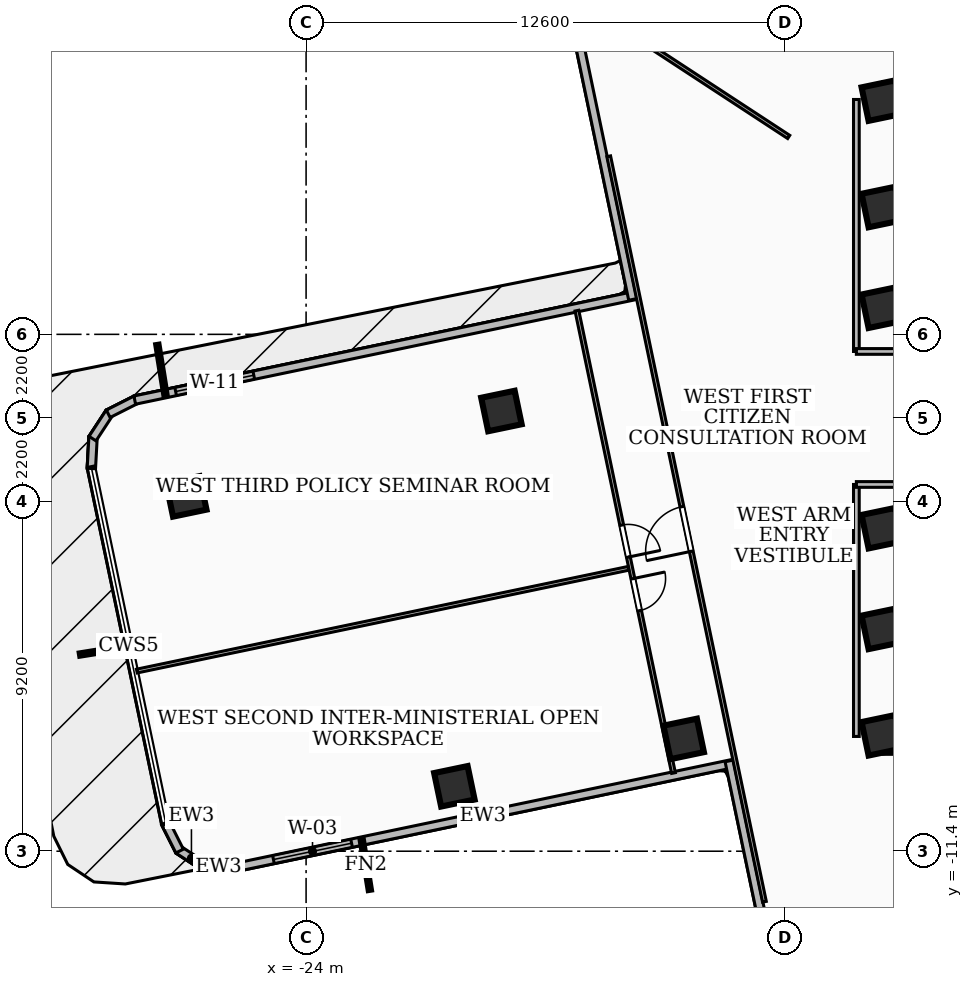
"""IFC4 building model, lengths in metres.
Left out: names, types, materials, properties, quantities, classifications, styles, units other than length and angle.
Written with IfcOpenShell. Run it as: python <this file> out.ifc"""

import sys

from ifc_helpers import new_model, si_unit, direction, frame, frame_2d, origin, origin_2d, place, context, subcontext, project, spatial, rectangle, extrude, element, fill, save


model = new_model("IFC4")
c1 = context("Model", 3, precision=1e-05, world=origin(), true_north=direction((0.0, 1.0)))
c2 = subcontext(c1, "Body", "Model", "MODEL_VIEW")
j1 = project(units=[si_unit("LENGTHUNIT", "METRE"), si_unit("PLANEANGLEUNIT", "RADIAN")], contexts=[c1])
p1 = place(None, origin())
s1 = spatial("IfcSite", under=j1, at=p1, CompositionType="ELEMENT")
p2 = place(p1, origin())
s2 = spatial("IfcBuilding", under=s1, at=p2, CompositionType="ELEMENT")
p3 = place(p2, frame((0.0, 0.0, 111.96)))
s3 = spatial("IfcBuildingStorey", under=s2, at=p3, CompositionType="ELEMENT", Elevation=111.96)
for number, where, z_axis, x_axis in (
    (1, (-8.78, 8.56, 0.0), (0.0, 0.0, 1.0), (1.0, 0.0, 0.0)),
    (2, (8.78, -8.56, 0.0), (0.0, 0.0, 1.0), (-1.0, 0.0, 0.0)),
):
    element("IfcWall", number, at=place(p3, frame(where, z_axis=z_axis, x_axis=x_axis)), inside=s3, PredefinedType="SHEAR", context=c2, shape_type="SweptSolid", body=[
        extrude(rectangle(XDim=17.56, YDim=0.5, at=frame_2d((8.78, 0.0))), origin(), (0.0, 0.0, 1.0), 4.06),
    ])
for number, where, z_axis, x_axis in (
    (3, (-8.85, -5.55, 0.0), (0.0, 0.0, 1.0), (0.979, 0.204, 0.0)),
    (4, (-8.85, -2.9, 0.0), (0.0, 0.0, 1.0), (0.979, 0.204, 0.0)),
    (5, (-8.85, 2.9, 0.0), (0.0, 0.0, 1.0), (0.979, 0.204, 0.0)),
    (6, (-8.85, 5.55, 0.0), (0.0, 0.0, 1.0), (0.979, 0.204, 0.0)),
    (7, (-8.85, 8.35, 0.0), (0.0, 0.0, 1.0), (0.979, 0.204, 0.0)),
    (8, (-8.85, -8.35, 0.0), (0.0, 0.0, 1.0), (0.979, 0.204, 0.0)),
    (9, (-18.86, 0.183, 0.0), (0.0, 0.0, 1.0), (0.979, 0.204, 0.0)),
    (10, (-14.064, -8.445, 0.0), (0.0, 0.0, 1.0), (0.979, 0.204, 0.0)),
    (11, (-27.153, -2.064, 0.0), (0.0, 0.0, 1.0), (0.979, 0.204, 0.0)),
    (12, (-20.098, -9.692, 0.0), (0.0, 0.0, 1.0), (0.979, 0.204, 0.0)),
):
    element("IfcColumn", number, at=place(p3, frame(where, z_axis=z_axis, x_axis=x_axis)), inside=s3, PredefinedType="COLUMN", context=c2, shape_type="SweptSolid", body=[
        extrude(rectangle(XDim=0.9, YDim=0.9, at=origin_2d()), origin(), (0.0, 0.0, 1.0), 4.32),
    ])
p4 = place(p3, frame((-12.763, -9.092, 0.0), z_axis=(0.0, 0.0, 1.0), x_axis=(-0.97886813171, -0.204492495517, 0.0)))
e13 = element("IfcWall", 13, at=p4, inside=s3, PredefinedType="SOLIDWALL", context=c2, shape_type="SweptSolid", body=[
    extrude(rectangle(XDim=13.458, YDim=0.22, at=frame_2d((6.729, 0.0))), origin(), (0.0, 0.0, 1.0), 4.06),
])
p5 = place(p4, frame((10.257, 0.0, 0.85)))
e14 = element("IfcOpeningElement", 14, at=p5, cuts=e13, PredefinedType="OPENING", context=c2, shape_type="SweptSolid", body=[
    extrude(rectangle(XDim=2.1, YDim=2.0, at=frame_2d((1.05, 1.0))), frame((0.0, 0.12, 0.0), z_axis=(0.0, -1.0, 0.0), x_axis=(1.0, 0.0, 0.0)), (0.0, 0.0, 1.0), 0.24),
])
p6 = place(p3, frame((-25.887, -11.84, 0.0), z_axis=(0.0, 0.0, 1.0), x_axis=(-0.998469344193, 0.05530794433, 0.0)))
e15 = element("IfcWall", 15, at=p6, inside=s3, PredefinedType="SOLIDWALL", context=c2, shape_type="SweptSolid", body=[
    extrude(rectangle(XDim=0.834, YDim=0.22, at=frame_2d((0.417, 0.0))), origin(), (0.0, 0.0, 1.0), 4.06),
])
p7 = place(p3, frame((-26.674, -11.809, 0.0), z_axis=(0.0, 0.0, 1.0), x_axis=(-0.836738727822, 0.54760232045, 0.0)))
e16 = element("IfcWall", 16, at=p7, inside=s3, PredefinedType="SOLIDWALL", context=c2, shape_type="SweptSolid", body=[
    extrude(rectangle(XDim=0.82, YDim=0.22, at=frame_2d((0.41, 0.0))), origin(), (0.0, 0.0, 1.0), 4.06),
])
p8 = place(p3, frame((-27.328, -11.396, 0.0), z_axis=(0.0, 0.0, 1.0), x_axis=(-0.450141805655, 0.892957084524, 0.0)))
e17 = element("IfcWall", 17, at=p8, inside=s3, PredefinedType="SOLIDWALL", context=c2, shape_type="SweptSolid", body=[
    extrude(rectangle(XDim=0.833, YDim=0.22, at=frame_2d((0.417, 0.0))), origin(), (0.0, 0.0, 1.0), 4.06),
])
p9 = place(p3, frame((-29.651, -1.33, 0.0), z_axis=(0.0, 0.0, 1.0), x_axis=(0.055016197793, 0.998485462078, 0.0)))
e18 = element("IfcWall", 18, at=p9, inside=s3, PredefinedType="SOLIDWALL", context=c2, shape_type="SweptSolid", body=[
    extrude(rectangle(XDim=0.834, YDim=0.22, at=frame_2d((0.417, 0.0))), origin(), (0.0, 0.0, 1.0), 4.06),
])
p10 = place(p3, frame((-29.62, -0.543, 0.0), z_axis=(0.0, 0.0, 1.0), x_axis=(0.54835696222, 0.836244367386, 0.0)))
e19 = element("IfcWall", 19, at=p10, inside=s3, PredefinedType="SOLIDWALL", context=c2, shape_type="SweptSolid", body=[
    extrude(rectangle(XDim=0.819, YDim=0.22, at=frame_2d((0.41, 0.0))), origin(), (0.0, 0.0, 1.0), 4.06),
])
p11 = place(p3, frame((-29.207, 0.11, 0.0), z_axis=(0.0, 0.0, 1.0), x_axis=(0.892545226532, 0.450957890046, 0.0)))
e20 = element("IfcWall", 20, at=p11, inside=s3, PredefinedType="SOLIDWALL", context=c2, shape_type="SweptSolid", body=[
    extrude(rectangle(XDim=0.834, YDim=0.22, at=frame_2d((0.417, 0.0))), origin(), (0.0, 0.0, 1.0), 4.06),
])
p12 = place(p3, frame((-28.509, 0.47, 0.0), z_axis=(0.0, 0.0, 1.0), x_axis=(0.97885663995, 0.204547496749, 0.0)))
e21 = element("IfcWall", 21, at=p12, inside=s3, PredefinedType="SOLIDWALL", context=c2, shape_type="SweptSolid", body=[
    extrude(rectangle(XDim=13.459, YDim=0.22, at=frame_2d((6.729, 0.0))), origin(), (0.0, 0.0, 1.0), 4.06),
])
p13 = place(p12, frame((1.1, 0.0, 0.85)))
e22 = element("IfcOpeningElement", 22, at=p13, cuts=e21, PredefinedType="OPENING", context=c2, shape_type="SweptSolid", body=[
    extrude(rectangle(XDim=2.1, YDim=1.6, at=frame_2d((1.05, 0.8))), frame((0.0, 0.12, 0.0), z_axis=(0.0, -1.0, 0.0), x_axis=(1.0, 0.0, 0.0)), (0.0, 0.0, 1.0), 0.24),
])
p14 = place(p3, frame((-15.403, 3.119, 0.0), z_axis=(0.0, 0.0, 1.0), x_axis=(-0.204509735336, 0.978864530031, 0.0)))
e23 = element("IfcWall", 23, at=p14, inside=s3, PredefinedType="SOLIDWALL", context=c2, shape_type="SweptSolid", body=[
    extrude(rectangle(XDim=6.757, YDim=0.22, at=frame_2d((3.378, 0.0))), origin(), (0.0, 0.0, 1.0), 4.06),
])
p15 = place(p3, frame((-11.485, -15.639, 0.0), z_axis=(0.0, 0.0, 1.0), x_axis=(-0.204480806295, 0.978870573598, 0.0)))
e24 = element("IfcWall", 24, at=p15, inside=s3, PredefinedType="SOLIDWALL", context=c2, shape_type="SweptSolid", body=[
    extrude(rectangle(XDim=6.758, YDim=0.22, at=frame_2d((3.379, 0.0))), origin(), (0.0, 0.0, 1.0), 4.06),
])
p16 = place(p3, frame((-9.52, 1.75, 0.0), z_axis=(0.0, 0.0, 1.0), x_axis=(0.0, 1.0, 0.0)))
e25 = element("IfcWall", 25, at=p16, inside=s3, PredefinedType="PARTITIONING", context=c2, shape_type="SweptSolid", body=[
    extrude(rectangle(XDim=6.63, YDim=0.15, at=frame_2d((3.315, 0.0))), origin(), (0.0, 0.0, 1.0), 3.29),
])
p17 = place(p3, frame((-7.85, 1.75, 0.0), z_axis=(0.0, 0.0, 1.0), x_axis=(-1.0, 0.0, 0.0)))
e26 = element("IfcWall", 26, at=p17, inside=s3, PredefinedType="PARTITIONING", context=c2, shape_type="SweptSolid", body=[
    extrude(rectangle(XDim=1.67, YDim=0.15, at=frame_2d((0.835, 0.0))), origin(), (0.0, 0.0, 1.0), 3.29),
])
p18 = place(p3, frame((-9.52, -8.38, 0.0), z_axis=(0.0, 0.0, 1.0), x_axis=(0.0, 1.0, 0.0)))
e27 = element("IfcWall", 27, at=p18, inside=s3, PredefinedType="PARTITIONING", context=c2, shape_type="SweptSolid", body=[
    extrude(rectangle(XDim=6.63, YDim=0.15, at=frame_2d((3.315, 0.0))), origin(), (0.0, 0.0, 1.0), 3.29),
])
p19 = place(p3, frame((-7.85, -1.75, 0.0), z_axis=(0.0, 0.0, 1.0), x_axis=(-1.0, 0.0, 0.0)))
e28 = element("IfcWall", 28, at=p19, inside=s3, PredefinedType="PARTITIONING", context=c2, shape_type="SweptSolid", body=[
    extrude(rectangle(XDim=1.67, YDim=0.15, at=frame_2d((0.835, 0.0))), origin(), (0.0, 0.0, 1.0), 3.29),
])
p20 = place(p3, frame((-11.3, 7.394, 0.0), z_axis=(0.0, 0.0, 1.0), x_axis=(-0.836731843599, 0.547612839429, 0.0)))
e29 = element("IfcWall", 29, at=p20, inside=s3, PredefinedType="PARTITIONING", context=c2, shape_type="SweptSolid", body=[
    extrude(rectangle(XDim=6.17, YDim=0.1, at=frame_2d((3.085, 0.0))), origin(), (0.0, 0.0, 1.0), 4.06),
])
p21 = place(p3, frame((-6.792, -10.38, 0.0), z_axis=(0.0, 0.0, 1.0), x_axis=(-0.547596764532, -0.836742363858, 0.0)))
e30 = element("IfcWall", 30, at=p21, inside=s3, PredefinedType="PARTITIONING", context=c2, shape_type="SweptSolid", body=[
    extrude(rectangle(XDim=7.27, YDim=0.1, at=frame_2d((3.635, 0.0))), origin(), (0.0, 0.0, 1.0), 3.29),
])
p22 = place(p3, frame((-11.939, -12.73, 0.0), z_axis=(0.0, 0.0, 1.0), x_axis=(-0.204503489908, 0.978865834839, 0.0)))
e31 = element("IfcWall", 31, at=p22, inside=s3, PredefinedType="PARTITIONING", context=c2, shape_type="SweptSolid", body=[
    extrude(rectangle(XDim=20.04, YDim=0.1, at=frame_2d((10.02, 0.0))), origin(), (0.0, 0.0, 1.0), 3.29),
])
p23 = place(p22, frame((9.42, 0.0, 0.0)))
e32 = element("IfcOpeningElement", 32, at=p23, cuts=e31, PredefinedType="OPENING", context=c2, shape_type="SweptSolid", body=[
    extrude(rectangle(XDim=1.2, YDim=2.1, at=frame_2d((0.6, 1.05))), frame((0.0, 0.06, 0.0), z_axis=(0.0, -1.0, 0.0), x_axis=(1.0, 0.0, 0.0)), (0.0, 0.0, 1.0), 0.12),
])
p24 = place(p3, frame((-15.519, -3.957, 0.0), z_axis=(0.0, 0.0, 1.0), x_axis=(-0.978858202992, -0.20454001671, 0.0)))
e33 = element("IfcWall", 33, at=p24, inside=s3, PredefinedType="PARTITIONING", context=c2, shape_type="SweptSolid", body=[
    extrude(rectangle(XDim=13.214, YDim=0.1, at=frame_2d((6.607, 0.0))), origin(), (0.0, 0.0, 1.0), 3.44),
])
p25 = place(p3, frame((-16.874, 2.824, 0.0), z_axis=(0.0, 0.0, 1.0), x_axis=(0.204509549155, -0.978864568929, 0.0)))
e34 = element("IfcWall", 34, at=p25, inside=s3, PredefinedType="PARTITIONING", context=c2, shape_type="SweptSolid", body=[
    extrude(rectangle(XDim=12.43, YDim=0.1, at=frame_2d((6.215, 0.0))), origin(), (0.0, 0.0, 1.0), 3.29),
])
p26 = place(p25, frame((5.765, 0.0, 0.0)))
e35 = element("IfcOpeningElement", 35, at=p26, cuts=e34, PredefinedType="OPENING", context=c2, shape_type="SweptSolid", body=[
    extrude(rectangle(XDim=0.86, YDim=2.04, at=frame_2d((0.43, 1.02))), frame((0.0, 0.06, 0.0), z_axis=(0.0, -1.0, 0.0), x_axis=(1.0, 0.0, 0.0)), (0.0, 0.0, 1.0), 0.12),
])
p27 = place(p25, frame((7.205, 0.0, 0.0)))
e36 = element("IfcOpeningElement", 36, at=p27, cuts=e34, PredefinedType="OPENING", context=c2, shape_type="SweptSolid", body=[
    extrude(rectangle(XDim=0.86, YDim=2.04, at=frame_2d((0.43, 1.02))), frame((0.0, 0.06, 0.0), z_axis=(0.0, -1.0, 0.0), x_axis=(1.0, 0.0, 0.0)), (0.0, 0.0, 1.0), 0.12),
])
p28 = place(p5, origin())
e37 = element("IfcWindow", 37, at=p28, inside=s3, PartitioningType="SINGLE_PANEL", PredefinedType="WINDOW", context=c2, shape_type="SweptSolid", body=[
    extrude(rectangle(XDim=2.1, YDim=2.0, at=frame_2d((1.05, 1.0))), frame((0.0, 0.03, 0.0), z_axis=(0.0, -1.0, 0.0), x_axis=(1.0, 0.0, 0.0)), (0.0, 0.0, 1.0), 0.06),
])
fill(e14, e37)
p29 = place(p13, origin())
e38 = element("IfcWindow", 38, at=p29, inside=s3, PartitioningType="SINGLE_PANEL", PredefinedType="WINDOW", context=c2, shape_type="SweptSolid", body=[
    extrude(rectangle(XDim=2.1, YDim=1.6, at=frame_2d((1.05, 0.8))), frame((0.0, 0.03, 0.0), z_axis=(0.0, -1.0, 0.0), x_axis=(1.0, 0.0, 0.0)), (0.0, 0.0, 1.0), 0.06),
])
fill(e22, e38)
p30 = place(p23, origin())
e39 = element("IfcDoor", 39, at=p30, inside=s3, OperationType="SINGLE_SWING_LEFT", PredefinedType="DOOR", context=c2, shape_type="SweptSolid", body=[
    extrude(rectangle(XDim=1.2, YDim=2.1, at=frame_2d((0.6, 1.05))), frame((0.0, 0.025, 0.0), z_axis=(0.0, -1.0, 0.0), x_axis=(1.0, 0.0, 0.0)), (0.0, 0.0, 1.0), 0.05),
])
fill(e32, e39)
p31 = place(p26, origin())
e40 = element("IfcDoor", 40, at=p31, inside=s3, OperationType="SINGLE_SWING_RIGHT", PredefinedType="DOOR", context=c2, shape_type="SweptSolid", body=[
    extrude(rectangle(XDim=0.86, YDim=2.04, at=frame_2d((0.43, 1.02))), frame((0.0, 0.025, 0.0), z_axis=(0.0, -1.0, 0.0), x_axis=(1.0, 0.0, 0.0)), (0.0, 0.0, 1.0), 0.05),
])
fill(e35, e40)
p32 = place(p27, origin())
e41 = element("IfcDoor", 41, at=p32, inside=s3, OperationType="SINGLE_SWING_LEFT", PredefinedType="DOOR", context=c2, shape_type="SweptSolid", body=[
    extrude(rectangle(XDim=0.86, YDim=2.04, at=frame_2d((0.43, 1.02))), frame((0.0, 0.025, 0.0), z_axis=(0.0, -1.0, 0.0), x_axis=(1.0, 0.0, 0.0)), (0.0, 0.0, 1.0), 0.05),
])
fill(e36, e41)
save(model, sys.argv[1])
